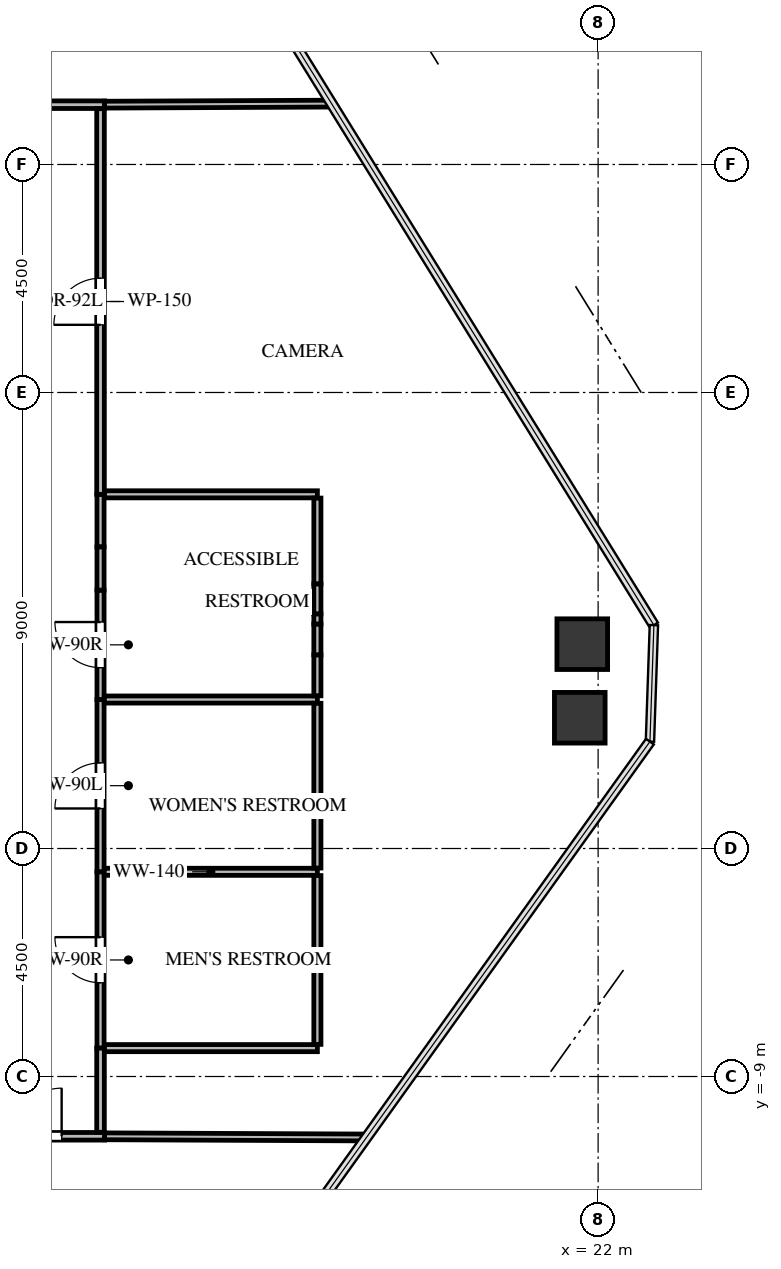
"""IFC4 building model, lengths in metres.
Left out: names, types, materials, properties, quantities, classifications, styles, units other than length and angle.
Written with IfcOpenShell. Run it as: python <this file> out.ifc"""

import sys

from ifc_helpers import new_model, si_unit, direction, frame, frame_2d, origin, origin_2d, place, context, subcontext, project, spatial, rectangle, extrude, source, transform, mapped, element, fill, save


model = new_model("IFC4")
c1 = context("Model", 3, precision=1e-05, world=origin(), true_north=direction((0.0, 1.0)))
c2 = subcontext(c1, "Body", "Model", "MODEL_VIEW")
j1 = project(units=[si_unit("LENGTHUNIT", "METRE"), si_unit("PLANEANGLEUNIT", "RADIAN")], contexts=[c1])
p1 = place(None, origin())
s1 = spatial("IfcSite", under=j1, at=p1, CompositionType="ELEMENT")
p2 = place(p1, origin())
s2 = spatial("IfcBuilding", under=s1, at=p2, CompositionType="ELEMENT")
p3 = place(p2, frame((0.0, 0.0, 159.3)))
s3 = spatial("IfcBuildingStorey", under=s2, at=p3, CompositionType="ELEMENT", Elevation=159.3)
m1 = source(origin(), c2, "Body", "SweptSolid", [
    extrude(rectangle(XDim=1.0, YDim=1.0, at=origin_2d()), origin(), (0.0, 0.0, 1.0), 3.22),
])
for number, where, z_axis, x_axis in (
    (1, (21.687, -0.467, -0.24), (0.0, 0.0, 1.0), (1.0, 0.0, 0.0)),
    (2, (21.638, -1.92, -0.24), (0.0, 0.0, 1.0), (1.0, 0.0, 0.0)),
):
    element("IfcColumn", number, at=place(p3, frame(where, z_axis=z_axis, x_axis=x_axis)), inside=s3, PredefinedType="COLUMN", context=c2, shape_type="MappedRepresentation", body=[
        mapped(m1, transform((0.0, 0.0, 0.0), x_axis=(1.0, 0.0, 0.0), y_axis=(0.0, 1.0, 0.0), z_axis=(0.0, 0.0, 1.0), scale=1.0)),
    ])
p4 = place(p3, frame((12.18, -8.44, 0.0), z_axis=(0.0, 0.0, 1.0), x_axis=(0.0, 1.0, 0.0)))
e3 = element("IfcWall", 3, at=p4, inside=s3, PredefinedType="PARTITIONING", context=c2, shape_type="SweptSolid", body=[
    extrude(rectangle(XDim=3.48, YDim=0.14, at=frame_2d((1.74, 0.0))), origin(), (0.0, 0.0, 1.0), 2.965),
])
p5 = place(p4, frame((1.29, 0.0, 0.0)))
e4 = element("IfcOpeningElement", 4, at=p5, cuts=e3, PredefinedType="OPENING", context=c2, shape_type="SweptSolid", body=[
    extrude(rectangle(XDim=0.9, YDim=2.05, at=frame_2d((0.45, 1.025))), frame((0.0, 0.08, 0.0), z_axis=(0.0, -1.0, 0.0), x_axis=(1.0, 0.0, 0.0)), (0.0, 0.0, 1.0), 0.16),
])
p6 = place(p3, frame((12.18, -4.96, 0.0), z_axis=(0.0, 0.0, 1.0), x_axis=(0.0, 1.0, 0.0)))
e5 = element("IfcWall", 5, at=p6, inside=s3, PredefinedType="PARTITIONING", context=c2, shape_type="SweptSolid", body=[
    extrude(rectangle(XDim=3.4, YDim=0.14, at=frame_2d((1.7, 0.0))), origin(), (0.0, 0.0, 1.0), 2.965),
])
p7 = place(p6, frame((1.25, 0.0, 0.0)))
e6 = element("IfcOpeningElement", 6, at=p7, cuts=e5, PredefinedType="OPENING", context=c2, shape_type="SweptSolid", body=[
    extrude(rectangle(XDim=0.9, YDim=2.05, at=frame_2d((0.45, 1.025))), frame((0.0, 0.08, 0.0), z_axis=(0.0, -1.0, 0.0), x_axis=(1.0, 0.0, 0.0)), (0.0, 0.0, 1.0), 0.16),
])
p8 = place(p3, frame((12.18, -1.56, 0.0), z_axis=(0.0, 0.0, 1.0), x_axis=(0.0, 1.0, 0.0)))
e7 = element("IfcWall", 7, at=p8, inside=s3, PredefinedType="PARTITIONING", context=c2, shape_type="SweptSolid", body=[
    extrude(rectangle(XDim=2.159, YDim=0.14, at=frame_2d((1.08, 0.0))), origin(), (0.0, 0.0, 1.0), 2.965),
])
p9 = place(p8, frame((0.629, 0.0, 0.0)))
e8 = element("IfcOpeningElement", 8, at=p9, cuts=e7, PredefinedType="OPENING", context=c2, shape_type="SweptSolid", body=[
    extrude(rectangle(XDim=0.9, YDim=2.05, at=frame_2d((0.45, 1.025))), frame((0.0, 0.08, 0.0), z_axis=(0.0, -1.0, 0.0), x_axis=(1.0, 0.0, 0.0)), (0.0, 0.0, 1.0), 0.16),
])
p10 = place(p3, frame((12.18, 1.452, 0.0), z_axis=(0.0, 0.0, 1.0), x_axis=(0.0, 1.0, 0.0)))
e9 = element("IfcWall", 9, at=p10, inside=s3, PredefinedType="PARTITIONING", context=c2, shape_type="SweptSolid", body=[
    extrude(rectangle(XDim=1.038, YDim=0.14, at=frame_2d((0.519, 0.0))), origin(), (0.0, 0.0, 1.0), 2.965),
])
p11 = place(p3, frame((12.18, 0.599, 0.0), z_axis=(0.0, 0.0, 1.0), x_axis=(0.0, 1.0, 0.0)))
e10 = element("IfcWall", 10, at=p11, inside=s3, PredefinedType="PARTITIONING", context=c2, shape_type="SweptSolid", body=[
    extrude(rectangle(XDim=0.853, YDim=0.14, at=frame_2d((0.427, 0.0))), origin(), (0.0, 0.0, 1.0), 2.162),
])
p12 = place(p3, frame((12.26, 10.18, 0.0), z_axis=(0.0, 0.0, 1.0), x_axis=(-1.0, 0.0, 0.0)))
e11 = element("IfcWall", 11, at=p12, inside=s3, PredefinedType="PARTITIONING", context=c2, shape_type="SweptSolid", body=[
    extrude(rectangle(XDim=1.114, YDim=0.15, at=frame_2d((0.557, 0.0))), origin(), (0.0, 0.0, 1.0), 2.965),
])
p13 = place(p3, frame((8.553, -10.18, 0.0), z_axis=(0.0, 0.0, 1.0), x_axis=(1.0, 0.0, 0.0)))
e12 = element("IfcWall", 12, at=p13, inside=s3, PredefinedType="PARTITIONING", context=c2, shape_type="SweptSolid", body=[
    extrude(rectangle(XDim=3.707, YDim=0.15, at=frame_2d((1.854, 0.0))), origin(), (0.0, 0.0, 1.0), 2.965),
])
p14 = place(p13, frame((1.91, 0.0, 0.0)))
e13 = element("IfcOpeningElement", 13, at=p14, cuts=e12, PredefinedType="OPENING", context=c2, shape_type="SweptSolid", body=[
    extrude(rectangle(XDim=0.95, YDim=2.1, at=frame_2d((0.475, 1.05))), frame((0.0, 0.085, 0.0), z_axis=(0.0, -1.0, 0.0), x_axis=(1.0, 0.0, 0.0)), (0.0, 0.0, 1.0), 0.17),
])
p15 = place(p3, frame((12.18, 2.49, 0.0), z_axis=(0.0, 0.0, 1.0), x_axis=(0.0, 1.0, 0.0)))
e14 = element("IfcWall", 14, at=p15, inside=s3, PredefinedType="PARTITIONING", context=c2, shape_type="SweptSolid", body=[
    extrude(rectangle(XDim=7.611, YDim=0.15, at=frame_2d((3.806, 0.0))), origin(), (0.0, 0.0, 1.0), 2.965),
])
p16 = place(p15, frame((3.345, 0.0, 0.0)))
e15 = element("IfcOpeningElement", 15, at=p16, cuts=e14, PredefinedType="OPENING", context=c2, shape_type="SweptSolid", body=[
    extrude(rectangle(XDim=0.92, YDim=2.1, at=frame_2d((0.46, 1.05))), frame((0.0, 0.085, 0.0), z_axis=(0.0, -1.0, 0.0), x_axis=(1.0, 0.0, 0.0)), (0.0, 0.0, 1.0), 0.17),
])
p17 = place(p3, frame((12.18, -10.101, 0.0), z_axis=(0.0, 0.0, 1.0), x_axis=(0.0, 1.0, 0.0)))
e16 = element("IfcWall", 16, at=p17, inside=s3, PredefinedType="PARTITIONING", context=c2, shape_type="SweptSolid", body=[
    extrude(rectangle(XDim=1.661, YDim=0.15, at=frame_2d((0.831, 0.0))), origin(), (0.0, 0.0, 1.0), 2.965),
])
p18 = place(p3, frame((12.254, -4.96, 0.0), z_axis=(0.0, 0.0, 1.0), x_axis=(1.0, 0.0, 0.0)))
e17 = element("IfcWall", 17, at=p18, inside=s3, PredefinedType="PARTITIONING", context=c2, shape_type="SweptSolid", body=[
    extrude(rectangle(XDim=4.206, YDim=0.14, at=frame_2d((2.103, 0.0))), origin(), (0.0, 0.0, 1.0), 2.965),
])
p19 = place(p3, frame((16.46, -8.44, 0.0), z_axis=(0.0, 0.0, 1.0), x_axis=(-1.0, 0.0, 0.0)))
e18 = element("IfcWall", 18, at=p19, inside=s3, PredefinedType="PARTITIONING", context=c2, shape_type="SweptSolid", body=[
    extrude(rectangle(XDim=4.201, YDim=0.14, at=frame_2d((2.101, 0.0))), origin(), (0.0, 0.0, 1.0), 2.965),
])
p20 = place(p3, frame((16.46, -5.034, 0.0), z_axis=(0.0, 0.0, 1.0), x_axis=(0.0, -1.0, 0.0)))
e19 = element("IfcWall", 19, at=p20, inside=s3, PredefinedType="PARTITIONING", context=c2, shape_type="SweptSolid", body=[
    extrude(rectangle(XDim=3.332, YDim=0.14, at=frame_2d((1.666, 0.0))), origin(), (0.0, 0.0, 1.0), 2.965),
])
p21 = place(p3, frame((12.254, -1.56, 0.0), z_axis=(0.0, 0.0, 1.0), x_axis=(1.0, 0.0, 0.0)))
e20 = element("IfcWall", 20, at=p21, inside=s3, PredefinedType="PARTITIONING", context=c2, shape_type="SweptSolid", body=[
    extrude(rectangle(XDim=4.206, YDim=0.14, at=frame_2d((2.103, 0.0))), origin(), (0.0, 0.0, 1.0), 2.965),
])
p22 = place(p3, frame((16.46, -1.634, 0.0), z_axis=(0.0, 0.0, 1.0), x_axis=(0.0, -1.0, 0.0)))
e21 = element("IfcWall", 21, at=p22, inside=s3, PredefinedType="PARTITIONING", context=c2, shape_type="SweptSolid", body=[
    extrude(rectangle(XDim=3.252, YDim=0.14, at=frame_2d((1.626, 0.0))), origin(), (0.0, 0.0, 1.0), 2.965),
])
p23 = place(p3, frame((12.259, 2.49, 0.0), z_axis=(0.0, 0.0, 1.0), x_axis=(1.0, 0.0, 0.0)))
e22 = element("IfcWall", 22, at=p23, inside=s3, PredefinedType="PARTITIONING", context=c2, shape_type="SweptSolid", body=[
    extrude(rectangle(XDim=4.201, YDim=0.14, at=frame_2d((2.101, 0.0))), origin(), (0.0, 0.0, 1.0), 2.965),
])
p24 = place(p3, frame((16.46, 2.416, 0.0), z_axis=(0.0, 0.0, 1.0), x_axis=(0.0, -1.0, 0.0)))
e23 = element("IfcWall", 23, at=p24, inside=s3, PredefinedType="PARTITIONING", context=c2, shape_type="SweptSolid", body=[
    extrude(rectangle(XDim=1.696, YDim=0.14, at=frame_2d((0.848, 0.0))), origin(), (0.0, 0.0, 1.0), 2.965),
])
p25 = place(p3, frame((16.46, 0.131, 0.0), z_axis=(0.0, 0.0, 1.0), x_axis=(0.0, -1.0, 0.0)))
e24 = element("IfcWall", 24, at=p25, inside=s3, PredefinedType="PARTITIONING", context=c2, shape_type="SweptSolid", body=[
    extrude(rectangle(XDim=0.203, YDim=0.14, at=frame_2d((0.102, 0.0))), origin(), (0.0, 0.0, 1.0), 2.965),
])
p26 = place(p3, frame((16.46, -0.678, 0.0), z_axis=(0.0, 0.0, 1.0), x_axis=(0.0, -1.0, 0.0)))
e25 = element("IfcWall", 25, at=p26, inside=s3, PredefinedType="PARTITIONING", context=c2, shape_type="SweptSolid", body=[
    extrude(rectangle(XDim=0.808, YDim=0.14, at=frame_2d((0.404, 0.0))), origin(), (0.0, 0.0, 1.0), 2.965),
])
p27 = place(p3, frame((16.46, 0.72, 0.0), z_axis=(0.0, 0.0, 1.0), x_axis=(0.0, -1.0, 0.0)))
e26 = element("IfcWall", 26, at=p27, inside=s3, PredefinedType="PARTITIONING", context=c2, shape_type="SweptSolid", body=[
    extrude(rectangle(XDim=0.589, YDim=0.14, at=frame_2d((0.294, 0.0))), origin(), (0.0, 0.0, 1.0), 2.162),
])
p28 = place(p3, frame((16.46, -0.072, 0.0), z_axis=(0.0, 0.0, 1.0), x_axis=(0.0, -1.0, 0.0)))
e27 = element("IfcWall", 27, at=p28, inside=s3, PredefinedType="PARTITIONING", context=c2, shape_type="SweptSolid", body=[
    extrude(rectangle(XDim=0.606, YDim=0.14, at=frame_2d((0.303, 0.0))), origin(), (0.0, 0.0, 1.0), 2.162),
])
p29 = place(p3, frame((16.74, 10.201, 0.0), z_axis=(0.0, 0.0, 1.0), x_axis=(-0.999989522694, -0.004577608714, 0.0)))
e28 = element("IfcWall", 28, at=p29, inside=s3, PredefinedType="PARTITIONING", context=c2, shape_type="SweptSolid", body=[
    extrude(rectangle(XDim=4.48, YDim=0.135, at=frame_2d((2.24, 0.0))), origin(), (0.0, 0.0, 1.0), 2.319),
])
p30 = place(p3, frame((12.26, -10.18, 0.0), z_axis=(0.0, 0.0, 1.0), x_axis=(0.999990144117, -0.004439782427, 0.0)))
e29 = element("IfcWall", 29, at=p30, inside=s3, PredefinedType="PARTITIONING", context=c2, shape_type="SweptSolid", body=[
    extrude(rectangle(XDim=5.169, YDim=0.135, at=frame_2d((2.584, 0.0))), origin(), (0.0, 0.0, 1.0), 2.319),
])
m2 = source(origin(), c2, "Body", "SweptSolid", [
    extrude(rectangle(XDim=0.9, YDim=2.05, at=frame_2d((0.45, 1.025))), frame((0.0, 0.025, 0.0), z_axis=(0.0, -1.0, 0.0), x_axis=(1.0, 0.0, 0.0)), (0.0, 0.0, 1.0), 0.05),
])
p31 = place(p5, origin())
e30 = element("IfcDoor", 30, at=p31, inside=s3, OperationType="SINGLE_SWING_RIGHT", PredefinedType="DOOR", context=c2, shape_type="MappedRepresentation", body=[
    mapped(m2, transform((0.0, 0.0, 0.0), x_axis=(1.0, 0.0, 0.0), y_axis=(0.0, 1.0, 0.0), z_axis=(0.0, 0.0, 1.0), scale=1.0)),
])
fill(e4, e30)
m3 = source(origin(), c2, "Body", "SweptSolid", [
    extrude(rectangle(XDim=0.9, YDim=2.05, at=frame_2d((0.45, 1.025))), frame((0.0, 0.025, 0.0), z_axis=(0.0, -1.0, 0.0), x_axis=(1.0, 0.0, 0.0)), (0.0, 0.0, 1.0), 0.05),
])
p32 = place(p7, origin())
e31 = element("IfcDoor", 31, at=p32, inside=s3, OperationType="SINGLE_SWING_LEFT", PredefinedType="DOOR", context=c2, shape_type="MappedRepresentation", body=[
    mapped(m3, transform((0.0, 0.0, 0.0), x_axis=(1.0, 0.0, 0.0), y_axis=(0.0, 1.0, 0.0), z_axis=(0.0, 0.0, 1.0), scale=1.0)),
])
fill(e6, e31)
p33 = place(p9, origin())
e32 = element("IfcDoor", 32, at=p33, inside=s3, OperationType="SINGLE_SWING_RIGHT", PredefinedType="DOOR", context=c2, shape_type="MappedRepresentation", body=[
    mapped(m2, transform((0.0, 0.0, 0.0), x_axis=(1.0, 0.0, 0.0), y_axis=(0.0, 1.0, 0.0), z_axis=(0.0, 0.0, 1.0), scale=1.0)),
])
fill(e8, e32)
m4 = source(origin(), c2, "Body", "SweptSolid", [
    extrude(rectangle(XDim=0.95, YDim=2.1, at=frame_2d((0.475, 1.05))), frame((0.0, 0.025, 0.0), z_axis=(0.0, -1.0, 0.0), x_axis=(1.0, 0.0, 0.0)), (0.0, 0.0, 1.0), 0.05),
])
p34 = place(p14, origin())
e33 = element("IfcDoor", 33, at=p34, inside=s3, OperationType="SINGLE_SWING_RIGHT", PredefinedType="DOOR", context=c2, shape_type="MappedRepresentation", body=[
    mapped(m4, transform((0.0, 0.0, 0.0), x_axis=(1.0, 0.0, 0.0), y_axis=(0.0, 1.0, 0.0), z_axis=(0.0, 0.0, 1.0), scale=1.0)),
])
fill(e13, e33)
m5 = source(origin(), c2, "Body", "SweptSolid", [
    extrude(rectangle(XDim=0.92, YDim=2.1, at=frame_2d((0.46, 1.05))), frame((0.0, 0.025, 0.0), z_axis=(0.0, -1.0, 0.0), x_axis=(1.0, 0.0, 0.0)), (0.0, 0.0, 1.0), 0.05),
])
p35 = place(p16, origin())
e34 = element("IfcDoor", 34, at=p35, inside=s3, OperationType="SINGLE_SWING_LEFT", PredefinedType="DOOR", context=c2, shape_type="MappedRepresentation", body=[
    mapped(m5, transform((0.0, 0.0, 0.0), x_axis=(1.0, 0.0, 0.0), y_axis=(0.0, 1.0, 0.0), z_axis=(0.0, 0.0, 1.0), scale=1.0)),
])
fill(e15, e34)
save(model, sys.argv[1])
